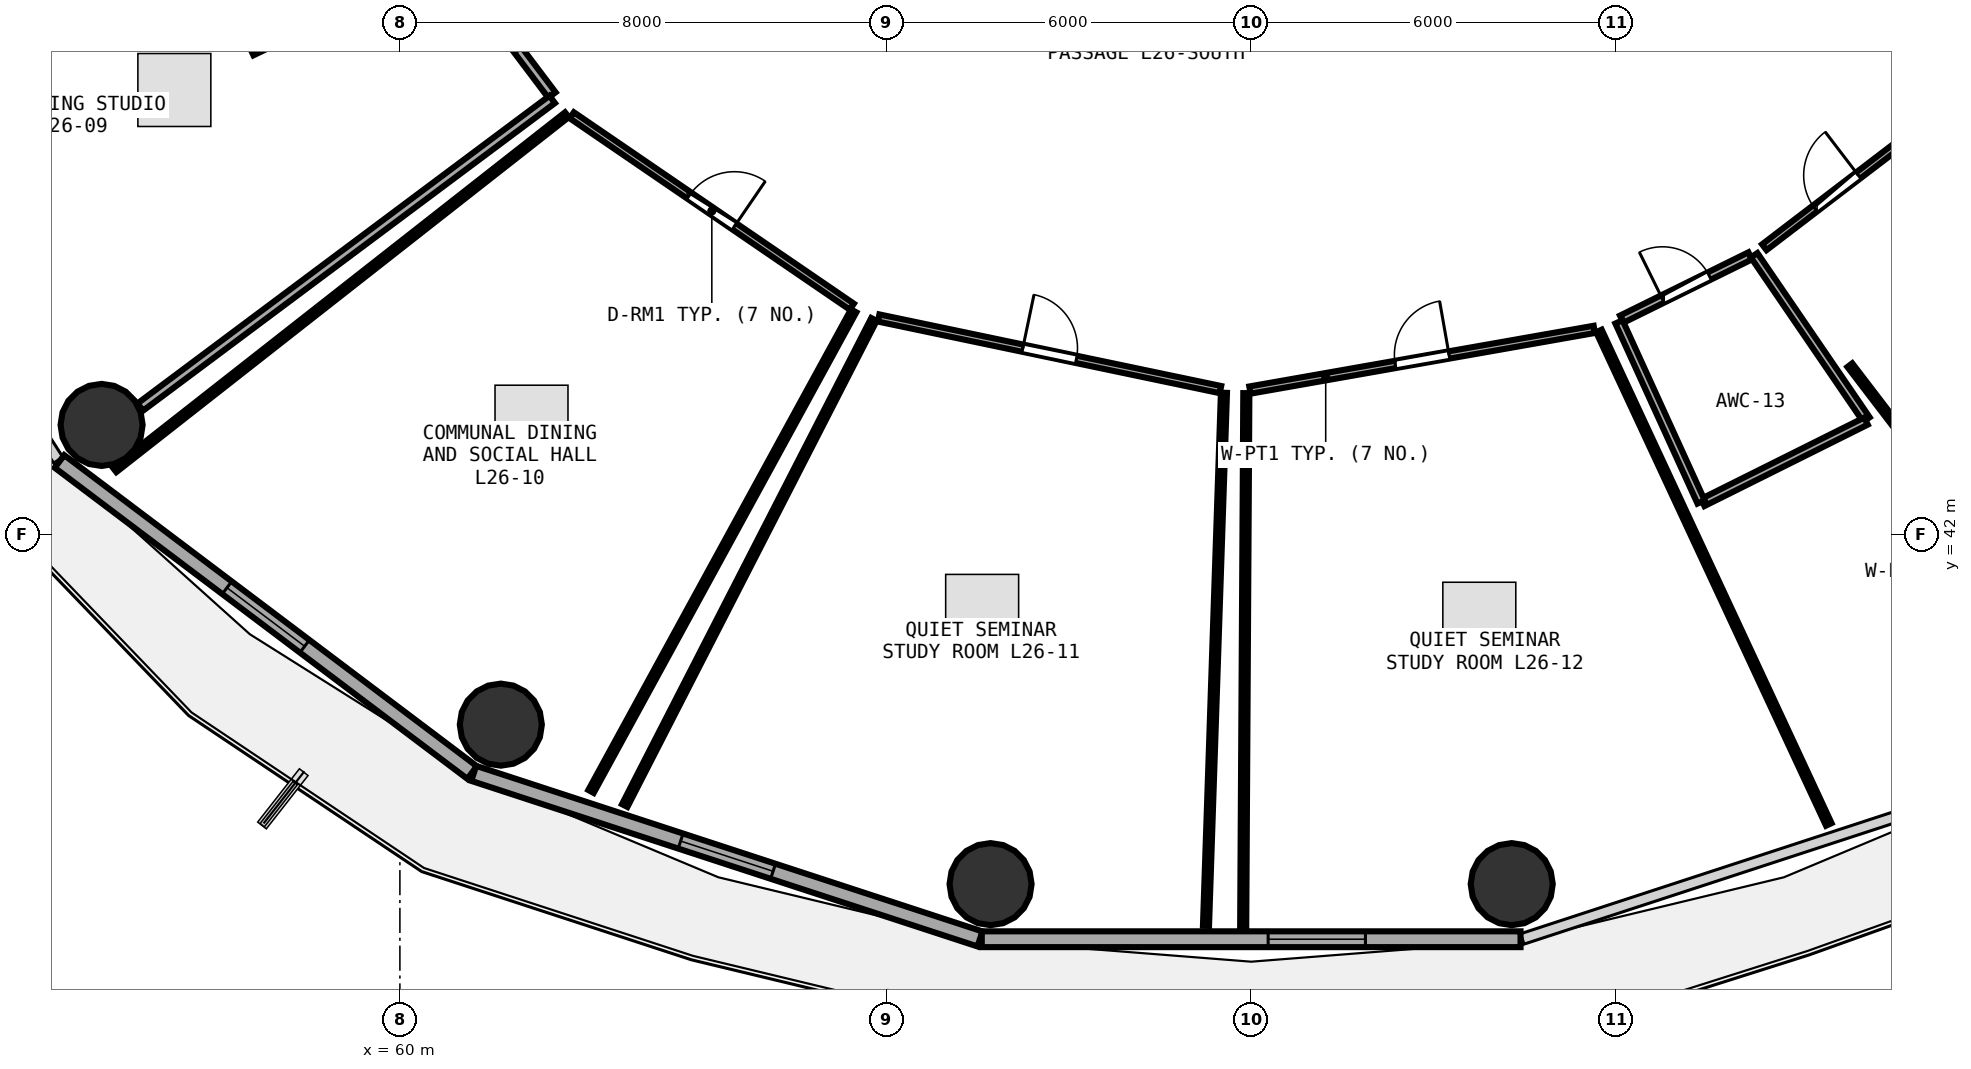
"""IFC4 building model, lengths in metres.
Left out: names, types, materials, properties, quantities, classifications, styles, units other than length and angle.
Written with IfcOpenShell. Run it as: python <this file> out.ifc"""

import sys

from ifc_helpers import new_model, si_unit, direction, frame, frame_2d, origin, origin_2d, place, context, subcontext, project, spatial, rectangle, circle, extrude, element, fill, save


model = new_model("IFC4")
c1 = context("Model", 3, precision=1e-05, world=origin(), true_north=direction((0.0, 1.0)))
c2 = subcontext(c1, "Body", "Model", "MODEL_VIEW")
j1 = project(units=[si_unit("LENGTHUNIT", "METRE"), si_unit("PLANEANGLEUNIT", "RADIAN")], contexts=[c1])
p1 = place(None, origin())
s1 = spatial("IfcSite", under=j1, at=p1, CompositionType="ELEMENT")
p2 = place(p1, origin())
s2 = spatial("IfcBuilding", under=s1, at=p2, CompositionType="ELEMENT")
p3 = place(p2, frame((0.0, 0.0, 102.6)))
s3 = spatial("IfcBuildingStorey", under=s2, at=p3, CompositionType="ELEMENT", Elevation=102.6)
for number, where, z_axis, x_axis in (
    (1, (55.094, 43.807, 0.0), (0.0, 0.0, 1.0), (1.0, 0.0, 0.0)),
    (2, (61.66, 38.878, 0.0), (0.0, 0.0, 1.0), (1.0, 0.0, 0.0)),
    (3, (69.714, 36.255, 0.0), (0.0, 0.0, 1.0), (1.0, 0.0, 0.0)),
    (4, (78.286, 36.255, 0.0), (0.0, 0.0, 1.0), (1.0, 0.0, 0.0)),
):
    element("IfcColumn", number, at=place(p3, frame(where, z_axis=z_axis, x_axis=x_axis)), inside=s3, PredefinedType="COLUMN", context=c2, shape_type="SweptSolid", body=[
        extrude(circle(Radius=0.675, at=origin_2d()), origin(), (0.0, 0.0, 1.0), 3.75),
    ])
p4 = place(p3, frame((54.401, 43.207, 0.0), z_axis=(0.0, 0.0, 1.0), x_axis=(0.798501507879, -0.601992808857, 0.0)))
e5 = element("IfcWall", 5, at=p4, inside=s3, PredefinedType="SOLIDWALL", context=c2, shape_type="SweptSolid", body=[
    extrude(rectangle(XDim=8.499, YDim=0.26, at=frame_2d((4.25, 0.0))), origin(), (0.0, 0.0, 1.0), 3.475),
])
p5 = place(p4, frame((3.45, 0.0, 0.85)))
e6 = element("IfcOpeningElement", 6, at=p5, cuts=e5, PredefinedType="OPENING", context=c2, shape_type="SweptSolid", body=[
    extrude(rectangle(XDim=1.6, YDim=1.45, at=frame_2d((0.8, 0.725))), frame((0.0, 0.14, 0.0), z_axis=(0.0, -1.0, 0.0), x_axis=(1.0, 0.0, 0.0)), (0.0, 0.0, 1.0), 0.28),
])
p6 = place(p3, frame((61.214, 38.077, 0.0), z_axis=(0.0, 0.0, 1.0), x_axis=(0.950471101963, -0.310812941064, 0.0)))
e7 = element("IfcWall", 7, at=p6, inside=s3, PredefinedType="SOLIDWALL", context=c2, shape_type="SweptSolid", body=[
    extrude(rectangle(XDim=8.76, YDim=0.26, at=frame_2d((4.38, 0.0))), origin(), (0.0, 0.0, 1.0), 3.475),
])
p7 = place(p6, frame((3.58, 0.0, 0.85)))
e8 = element("IfcOpeningElement", 8, at=p7, cuts=e7, PredefinedType="OPENING", context=c2, shape_type="SweptSolid", body=[
    extrude(rectangle(XDim=1.6, YDim=1.45, at=frame_2d((0.8, 0.725))), frame((0.0, 0.14, 0.0), z_axis=(0.0, -1.0, 0.0), x_axis=(1.0, 0.0, 0.0)), (0.0, 0.0, 1.0), 0.28),
])
p8 = place(p3, frame((69.57, 35.349, 0.0), z_axis=(0.0, 0.0, 1.0), x_axis=(1.0, 0.0, 0.0)))
e9 = element("IfcWall", 9, at=p8, inside=s3, PredefinedType="SOLIDWALL", context=c2, shape_type="SweptSolid", body=[
    extrude(rectangle(XDim=8.861, YDim=0.26, at=frame_2d((4.43, 0.0))), origin(), (0.0, 0.0, 1.0), 3.475),
])
p9 = place(p8, frame((4.71, 0.0, 0.85)))
e10 = element("IfcOpeningElement", 10, at=p9, cuts=e9, PredefinedType="OPENING", context=c2, shape_type="SweptSolid", body=[
    extrude(rectangle(XDim=1.6, YDim=1.45, at=frame_2d((0.8, 0.725))), frame((0.0, 0.14, 0.0), z_axis=(0.0, -1.0, 0.0), x_axis=(1.0, 0.0, 0.0)), (0.0, 0.0, 1.0), 0.28),
])
p10 = place(p3, frame((60.827, 51.45, 0.0), z_axis=(0.0, 0.0, 1.0), x_axis=(0.602330864847, -0.798246534131, 0.0)))
e11 = element("IfcWall", 11, at=p10, inside=s3, PredefinedType="PARTITIONING", context=c2, shape_type="SweptSolid", body=[
    extrude(rectangle(XDim=2.779, YDim=0.15, at=frame_2d((1.389, 0.0))), origin(), (0.0, 0.0, 1.0), 2.925),
])
p11 = place(p10, frame((0.914, 0.0, 0.0)))
e12 = element("IfcOpeningElement", 12, at=p11, cuts=e11, PredefinedType="OPENING", context=c2, shape_type="SweptSolid", body=[
    extrude(rectangle(XDim=0.95, YDim=2.08, at=frame_2d((0.475, 1.04))), frame((0.0, 0.085, 0.0), z_axis=(0.0, -1.0, 0.0), x_axis=(1.0, 0.0, 0.0)), (0.0, 0.0, 1.0), 0.17),
])
p12 = place(p3, frame((62.827, 48.899, 0.0), z_axis=(0.0, 0.0, 1.0), x_axis=(0.825618475233, -0.564228795219, 0.0)))
e13 = element("IfcWall", 13, at=p12, inside=s3, PredefinedType="PARTITIONING", context=c2, shape_type="SweptSolid", body=[
    extrude(rectangle(XDim=5.578, YDim=0.12, at=frame_2d((2.789, 0.0))), origin(), (0.0, 0.0, 1.0), 2.925),
])
p13 = place(p12, frame((2.339, 0.0, 0.0)))
e14 = element("IfcOpeningElement", 14, at=p13, cuts=e13, PredefinedType="OPENING", context=c2, shape_type="SweptSolid", body=[
    extrude(rectangle(XDim=0.9, YDim=2.08, at=frame_2d((0.45, 1.04))), frame((0.0, 0.07, 0.0), z_axis=(0.0, -1.0, 0.0), x_axis=(1.0, 0.0, 0.0)), (0.0, 0.0, 1.0), 0.14),
])
p14 = place(p3, frame((67.874, 45.566, 0.0), z_axis=(0.0, 0.0, 1.0), x_axis=(0.978759890472, -0.205009943184, 0.0)))
e15 = element("IfcWall", 15, at=p14, inside=s3, PredefinedType="PARTITIONING", context=c2, shape_type="SweptSolid", body=[
    extrude(rectangle(XDim=5.744, YDim=0.12, at=frame_2d((2.872, 0.0))), origin(), (0.0, 0.0, 1.0), 3.235),
])
p15 = place(p14, frame((2.422, 0.0, 0.0)))
e16 = element("IfcOpeningElement", 16, at=p15, cuts=e15, PredefinedType="OPENING", context=c2, shape_type="SweptSolid", body=[
    extrude(rectangle(XDim=0.9, YDim=2.08, at=frame_2d((0.45, 1.04))), frame((0.0, 0.07, 0.0), z_axis=(0.0, -1.0, 0.0), x_axis=(1.0, 0.0, 0.0)), (0.0, 0.0, 1.0), 0.14),
])
p16 = place(p3, frame((73.98, 44.38, 0.0), z_axis=(0.0, 0.0, 1.0), x_axis=(0.984819435921, 0.17358190756, 0.0)))
e17 = element("IfcWall", 17, at=p16, inside=s3, PredefinedType="PARTITIONING", context=c2, shape_type="SweptSolid", body=[
    extrude(rectangle(XDim=5.751, YDim=0.12, at=frame_2d((2.875, 0.0))), origin(), (0.0, 0.0, 1.0), 3.235),
])
p17 = place(p16, frame((2.426, 0.0, 0.0)))
e18 = element("IfcOpeningElement", 18, at=p17, cuts=e17, PredefinedType="OPENING", context=c2, shape_type="SweptSolid", body=[
    extrude(rectangle(XDim=0.9, YDim=2.08, at=frame_2d((0.45, 1.04))), frame((0.0, 0.07, 0.0), z_axis=(0.0, -1.0, 0.0), x_axis=(1.0, 0.0, 0.0)), (0.0, 0.0, 1.0), 0.14),
])
p18 = place(p3, frame((80.095, 45.546, 0.0), z_axis=(0.0, 0.0, 1.0), x_axis=(0.897003770221, 0.442022891046, 0.0)))
e19 = element("IfcWall", 19, at=p18, inside=s3, PredefinedType="PLUMBINGWALL", context=c2, shape_type="SweptSolid", body=[
    extrude(rectangle(XDim=2.355, YDim=0.13, at=frame_2d((1.178, 0.0))), origin(), (0.0, 0.0, 1.0), 2.925),
])
p19 = place(p18, frame((0.747, 0.0, 0.0)))
e20 = element("IfcOpeningElement", 20, at=p19, cuts=e19, PredefinedType="OPENING", context=c2, shape_type="SweptSolid", body=[
    extrude(rectangle(XDim=0.86, YDim=2.05, at=frame_2d((0.43, 1.025))), frame((0.0, 0.075, 0.0), z_axis=(0.0, -1.0, 0.0), x_axis=(1.0, 0.0, 0.0)), (0.0, 0.0, 1.0), 0.15),
])
p20 = place(p3, frame((82.44, 46.729, 0.0), z_axis=(0.0, 0.0, 1.0), x_axis=(0.794654066843, 0.607062528945, 0.0)))
e21 = element("IfcWall", 21, at=p20, inside=s3, PredefinedType="PARTITIONING", context=c2, shape_type="SweptSolid", body=[
    extrude(rectangle(XDim=2.993, YDim=0.12, at=frame_2d((1.497, 0.0))), origin(), (0.0, 0.0, 1.0), 2.925),
])
p21 = place(p20, frame((1.047, 0.0, 0.0)))
e22 = element("IfcOpeningElement", 22, at=p21, cuts=e21, PredefinedType="OPENING", context=c2, shape_type="SweptSolid", body=[
    extrude(rectangle(XDim=0.9, YDim=2.08, at=frame_2d((0.45, 1.04))), frame((0.0, 0.07, 0.0), z_axis=(0.0, -1.0, 0.0), x_axis=(1.0, 0.0, 0.0)), (0.0, 0.0, 1.0), 0.14),
])
p22 = place(p3, frame((62.505, 49.16, 0.0), z_axis=(0.0, 0.0, 1.0), x_axis=(-0.801231684565, -0.598354232582, 0.0)))
e23 = element("IfcWall", 23, at=p22, inside=s3, PredefinedType="PARTITIONING", context=c2, shape_type="SweptSolid", body=[
    extrude(rectangle(XDim=8.456, YDim=0.15, at=frame_2d((4.228, 0.0))), origin(), (0.0, 0.0, 1.0), 2.925),
])
p23 = place(p3, frame((57.559, 49.953, 0.0), z_axis=(0.0, 0.0, 1.0), x_axis=(0.902185129063, 0.431349038364, 0.0)))
e24 = element("IfcWall", 24, at=p23, inside=s3, PredefinedType="PARTITIONING", context=c2, shape_type="SweptSolid", body=[
    extrude(rectangle(XDim=1.298, YDim=0.15, at=frame_2d((0.649, 0.0))), origin(), (0.0, 0.0, 1.0), 3.175),
])
p24 = place(p3, frame((67.463, 45.683, 0.0), z_axis=(0.0, 0.0, 1.0), x_axis=(-0.479571724153, -0.87750268455, 0.0)))
e25 = element("IfcWall", 25, at=p24, inside=s3, PredefinedType="PARTITIONING", context=c2, shape_type="SweptSolid", body=[
    extrude(rectangle(XDim=9.007, YDim=0.1, at=frame_2d((4.503, 0.0))), origin(), (0.0, 0.0, 1.0), 2.925),
])
p25 = place(p3, frame((55.305, 43.071, 0.0), z_axis=(0.0, 0.0, 1.0), x_axis=(0.78679196563, 0.6172182781, 0.0)))
e26 = element("IfcWall", 26, at=p25, inside=s3, PredefinedType="PARTITIONING", context=c2, shape_type="SweptSolid", body=[
    extrude(rectangle(XDim=9.458, YDim=0.1, at=frame_2d((4.729, 0.0))), origin(), (0.0, 0.0, 1.0), 2.925),
])
p26 = place(p3, frame((73.553, 44.336, 0.0), z_axis=(0.0, 0.0, 1.0), x_axis=(-0.033680921614, -0.999432636809, 0.0)))
e27 = element("IfcWall", 27, at=p26, inside=s3, PredefinedType="PARTITIONING", context=c2, shape_type="SweptSolid", body=[
    extrude(rectangle(XDim=8.771, YDim=0.1, at=frame_2d((4.385, 0.0))), origin(), (0.0, 0.0, 1.0), 2.975),
])
p27 = place(p3, frame((63.697, 37.548, 0.0), z_axis=(0.0, 0.0, 1.0), x_axis=(0.456266444918, 0.889843205987, 0.0)))
e28 = element("IfcWall", 28, at=p27, inside=s3, PredefinedType="PARTITIONING", context=c2, shape_type="SweptSolid", body=[
    extrude(rectangle(XDim=8.985, YDim=0.1, at=frame_2d((4.492, 0.0))), origin(), (0.0, 0.0, 1.0), 2.925),
])
p28 = place(p3, frame((79.72, 45.353, 0.0), z_axis=(0.0, 0.0, 1.0), x_axis=(0.422225492456, -0.906490834769, 0.0)))
e29 = element("IfcWall", 29, at=p28, inside=s3, PredefinedType="PARTITIONING", context=c2, shape_type="SweptSolid", body=[
    extrude(rectangle(XDim=8.953, YDim=0.1, at=frame_2d((4.476, 0.0))), origin(), (0.0, 0.0, 1.0), 2.925),
])
p29 = place(p3, frame((73.869, 35.56, 0.0), z_axis=(0.0, 0.0, 1.0), x_axis=(0.005901573079, 0.999982585566, 0.0)))
e30 = element("IfcWall", 30, at=p29, inside=s3, PredefinedType="PARTITIONING", context=c2, shape_type="SweptSolid", body=[
    extrude(rectangle(XDim=8.77, YDim=0.1, at=frame_2d((4.385, 0.0))), origin(), (0.0, 0.0, 1.0), 2.975),
])
p30 = place(p3, frame((82.272, 46.597, 0.0), z_axis=(0.0, 0.0, 1.0), x_axis=(0.56421847533, -0.825625527764, 0.0)))
e31 = element("IfcWall", 31, at=p30, inside=s3, PredefinedType="PLUMBINGWALL", context=c2, shape_type="SweptSolid", body=[
    extrude(rectangle(XDim=3.272, YDim=0.13, at=frame_2d((1.636, 0.0))), origin(), (0.0, 0.0, 1.0), 3.235),
])
p31 = place(p3, frame((84.112, 43.87, 0.0), z_axis=(0.0, 0.0, 1.0), x_axis=(-0.89496337821, -0.446139610059, 0.0)))
e32 = element("IfcWall", 32, at=p31, inside=s3, PredefinedType="PLUMBINGWALL", context=c2, shape_type="SweptSolid", body=[
    extrude(rectangle(XDim=3.001, YDim=0.13, at=frame_2d((1.501, 0.0))), origin(), (0.0, 0.0, 1.0), 3.175),
])
p32 = place(p3, frame((81.4, 42.54, 0.0), z_axis=(0.0, 0.0, 1.0), x_axis=(-0.414882082756, 0.909875187819, 0.0)))
e33 = element("IfcWall", 33, at=p32, inside=s3, PredefinedType="PLUMBINGWALL", context=c2, shape_type="SweptSolid", body=[
    extrude(rectangle(XDim=3.255, YDim=0.13, at=frame_2d((1.627, 0.0))), origin(), (0.0, 0.0, 1.0), 2.925),
])
p33 = place(p3, frame((87.98, 39.383, 0.0), z_axis=(0.0, 0.0, 1.0), x_axis=(-0.607281003039, 0.794487119687, 0.0)))
e34 = element("IfcWall", 34, at=p33, inside=s3, PredefinedType="PARTITIONING", context=c2, shape_type="SweptSolid", body=[
    extrude(rectangle(XDim=6.806, YDim=0.1, at=frame_2d((3.403, 0.0))), origin(), (0.0, 0.0, 1.0), 2.925),
])
p34 = place(p5, origin())
e35 = element("IfcWindow", 35, at=p34, inside=s3, PartitioningType="SINGLE_PANEL", PredefinedType="WINDOW", context=c2, shape_type="SweptSolid", body=[
    extrude(rectangle(XDim=1.6, YDim=1.45, at=frame_2d((0.8, 0.725))), frame((0.0, 0.03, 0.0), z_axis=(0.0, -1.0, 0.0), x_axis=(1.0, 0.0, 0.0)), (0.0, 0.0, 1.0), 0.06),
])
fill(e6, e35)
p35 = place(p7, origin())
e36 = element("IfcWindow", 36, at=p35, inside=s3, PartitioningType="SINGLE_PANEL", PredefinedType="WINDOW", context=c2, shape_type="SweptSolid", body=[
    extrude(rectangle(XDim=1.6, YDim=1.45, at=frame_2d((0.8, 0.725))), frame((0.0, 0.03, 0.0), z_axis=(0.0, -1.0, 0.0), x_axis=(1.0, 0.0, 0.0)), (0.0, 0.0, 1.0), 0.06),
])
fill(e8, e36)
p36 = place(p9, origin())
e37 = element("IfcWindow", 37, at=p36, inside=s3, PartitioningType="SINGLE_PANEL", PredefinedType="WINDOW", context=c2, shape_type="SweptSolid", body=[
    extrude(rectangle(XDim=1.6, YDim=1.45, at=frame_2d((0.8, 0.725))), frame((0.0, 0.03, 0.0), z_axis=(0.0, -1.0, 0.0), x_axis=(1.0, 0.0, 0.0)), (0.0, 0.0, 1.0), 0.06),
])
fill(e10, e37)
p37 = place(p13, origin())
e38 = element("IfcDoor", 38, at=p37, inside=s3, OperationType="SINGLE_SWING_RIGHT", PredefinedType="DOOR", context=c2, shape_type="SweptSolid", body=[
    extrude(rectangle(XDim=0.9, YDim=2.08, at=frame_2d((0.45, 1.04))), frame((0.0, 0.025, 0.0), z_axis=(0.0, -1.0, 0.0), x_axis=(1.0, 0.0, 0.0)), (0.0, 0.0, 1.0), 0.05),
])
fill(e14, e38)
p38 = place(p15, origin())
e39 = element("IfcDoor", 39, at=p38, inside=s3, OperationType="SINGLE_SWING_LEFT", PredefinedType="DOOR", context=c2, shape_type="SweptSolid", body=[
    extrude(rectangle(XDim=0.9, YDim=2.08, at=frame_2d((0.45, 1.04))), frame((0.0, 0.025, 0.0), z_axis=(0.0, -1.0, 0.0), x_axis=(1.0, 0.0, 0.0)), (0.0, 0.0, 1.0), 0.05),
])
fill(e16, e39)
p39 = place(p17, origin())
e40 = element("IfcDoor", 40, at=p39, inside=s3, OperationType="SINGLE_SWING_RIGHT", PredefinedType="DOOR", context=c2, shape_type="SweptSolid", body=[
    extrude(rectangle(XDim=0.9, YDim=2.08, at=frame_2d((0.45, 1.04))), frame((0.0, 0.025, 0.0), z_axis=(0.0, -1.0, 0.0), x_axis=(1.0, 0.0, 0.0)), (0.0, 0.0, 1.0), 0.05),
])
fill(e18, e40)
p40 = place(p19, origin())
e41 = element("IfcDoor", 41, at=p40, inside=s3, OperationType="SINGLE_SWING_LEFT", PredefinedType="DOOR", context=c2, shape_type="SweptSolid", body=[
    extrude(rectangle(XDim=0.86, YDim=2.05, at=frame_2d((0.43, 1.025))), frame((0.0, 0.025, 0.0), z_axis=(0.0, -1.0, 0.0), x_axis=(1.0, 0.0, 0.0)), (0.0, 0.0, 1.0), 0.05),
])
fill(e20, e41)
p41 = place(p21, origin())
e42 = element("IfcDoor", 42, at=p41, inside=s3, OperationType="SINGLE_SWING_RIGHT", PredefinedType="DOOR", context=c2, shape_type="SweptSolid", body=[
    extrude(rectangle(XDim=0.9, YDim=2.08, at=frame_2d((0.45, 1.04))), frame((0.0, 0.025, 0.0), z_axis=(0.0, -1.0, 0.0), x_axis=(1.0, 0.0, 0.0)), (0.0, 0.0, 1.0), 0.05),
])
fill(e22, e42)
save(model, sys.argv[1])
